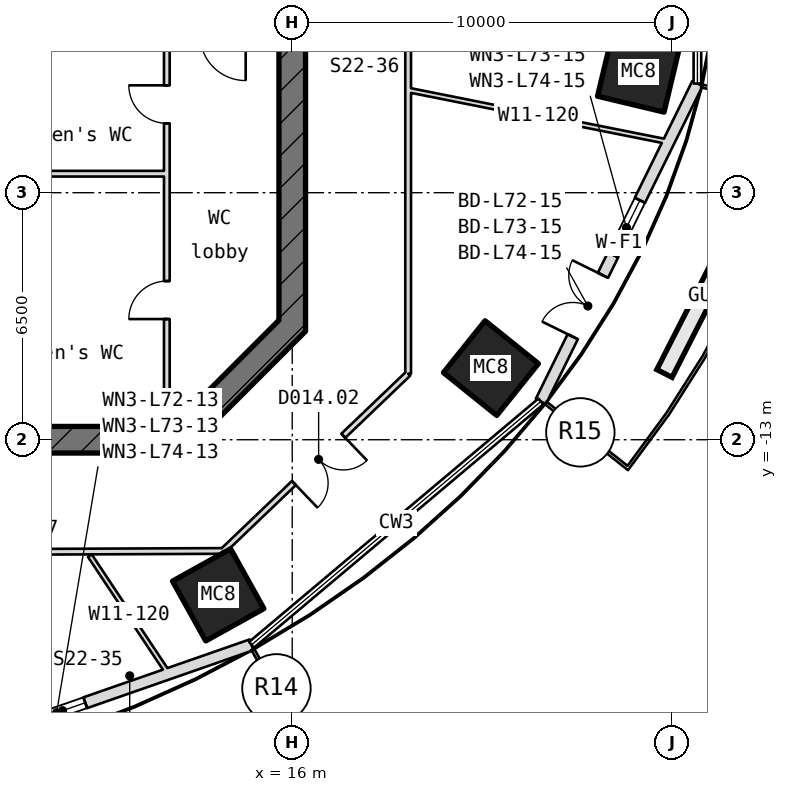
"""IFC4 building model, lengths in metres.
Left out: names, types, materials, properties, quantities, classifications, styles, units other than length and angle.
Written with IfcOpenShell. Run it as: python <this file> out.ifc"""

import sys

from ifc_helpers import new_model, si_unit, direction, frame, frame_2d, origin, origin_2d, place, context, subcontext, project, spatial, rectangle, hollow_rectangle, extrude, element, fill, save


model = new_model("IFC4")
c1 = context("Model", 3, precision=1e-05, world=origin(), true_north=direction((0.0, 1.0)))
c2 = subcontext(c1, "Body", "Model", "MODEL_VIEW")
j1 = project(units=[si_unit("LENGTHUNIT", "METRE"), si_unit("PLANEANGLEUNIT", "RADIAN")], contexts=[c1])
p1 = place(None, origin())
s1 = spatial("IfcSite", under=j1, at=p1, CompositionType="ELEMENT")
p2 = place(p1, origin())
s2 = spatial("IfcBuilding", under=s1, at=p2, CompositionType="ELEMENT")
p3 = place(p2, frame((0.0, 0.0, 321.85)))
s3 = spatial("IfcBuildingStorey", under=s2, at=p3, CompositionType="ELEMENT", Elevation=321.85)
for number, where, z_axis, x_axis in (
    (1, (14.052, -17.082, -0.18), (0.0, 0.0, 1.0), (-0.874, -0.486, 0.0)),
    (2, (21.228, -11.115, -0.18), (0.0, 0.0, 1.0), (-0.626, -0.779, 0.0)),
    (3, (25.112, -3.319, -0.18), (0.0, 0.0, 1.0), (-0.233, -0.973, 0.0)),
):
    element("IfcColumn", number, at=place(p3, frame(where, z_axis=z_axis, x_axis=x_axis)), inside=s3, PredefinedType="COLUMN", context=c2, shape_type="SweptSolid", body=[
        extrude(hollow_rectangle(XDim=1.75, YDim=1.8, WallThickness=0.055, at=origin_2d()), origin(), (0.0, 0.0, 1.0), 4.15),
    ])
p4 = place(p3, frame((4.983, -21.861, 0.0), z_axis=(0.0, 0.0, 1.0), x_axis=(0.944334385595, 0.328987185438, 0.0)))
e4 = element("IfcWall", 4, at=p4, inside=s3, PredefinedType="SOLIDWALL", context=c2, shape_type="SweptSolid", body=[
    extrude(rectangle(XDim=10.532, YDim=0.3, at=frame_2d((5.266, 0.0))), origin(), (0.0, 0.0, 1.0), 3.97),
])
p5 = place(p4, frame((1.9, 0.0, 0.0)))
e5 = element("IfcOpeningElement", 5, at=p5, cuts=e4, PredefinedType="OPENING", context=c2, shape_type="SweptSolid", body=[
    extrude(rectangle(XDim=1.8, YDim=2.4, at=frame_2d((0.9, 1.2))), frame((0.0, 0.16, 0.0), z_axis=(0.0, -1.0, 0.0), x_axis=(1.0, 0.0, 0.0)), (0.0, 0.0, 1.0), 0.32),
])
p6 = place(p4, frame((4.3, 0.0, 0.9)))
e6 = element("IfcOpeningElement", 6, at=p6, cuts=e4, PredefinedType="OPENING", context=c2, shape_type="SweptSolid", body=[
    extrude(rectangle(XDim=1.6, YDim=1.5, at=frame_2d((0.8, 0.75))), frame((0.0, 0.16, 0.0), z_axis=(0.0, -1.0, 0.0), x_axis=(1.0, 0.0, 0.0)), (0.0, 0.0, 1.0), 0.32),
])
p7 = place(p3, frame((22.542, -11.993, 0.0), z_axis=(0.0, 0.0, 1.0), x_axis=(0.441801707928, 0.897112730303, 0.0)))
e7 = element("IfcWall", 7, at=p7, inside=s3, PredefinedType="SOLIDWALL", context=c2, shape_type="SweptSolid", body=[
    extrude(rectangle(XDim=9.325, YDim=0.3, at=frame_2d((4.663, 0.0))), origin(), (0.0, 0.0, 1.0), 3.97),
])
p8 = place(p7, frame((1.9, 0.0, 0.0)))
e8 = element("IfcOpeningElement", 8, at=p8, cuts=e7, PredefinedType="OPENING", context=c2, shape_type="SweptSolid", body=[
    extrude(rectangle(XDim=1.8, YDim=2.4, at=frame_2d((0.9, 1.2))), frame((0.0, 0.16, 0.0), z_axis=(0.0, -1.0, 0.0), x_axis=(1.0, 0.0, 0.0)), (0.0, 0.0, 1.0), 0.32),
])
p9 = place(p7, frame((4.3, 0.0, 0.9)))
e9 = element("IfcOpeningElement", 9, at=p9, cuts=e7, PredefinedType="OPENING", context=c2, shape_type="SweptSolid", body=[
    extrude(rectangle(XDim=1.6, YDim=1.5, at=frame_2d((0.8, 0.75))), frame((0.0, 0.16, 0.0), z_axis=(0.0, -1.0, 0.0), x_axis=(1.0, 0.0, 0.0)), (0.0, 0.0, 1.0), 0.32),
])
p10 = place(p3, frame((12.897, -13.103, -0.18), z_axis=(0.0, 0.0, 1.0), x_axis=(0.707106781187, 0.707106781187, 0.0)))
e10 = element("IfcWall", 10, at=p10, inside=s3, PredefinedType="SHEAR", context=c2, shape_type="SweptSolid", body=[
    extrude(rectangle(XDim=4.533, YDim=0.7, at=frame_2d((2.266, 0.0))), origin(), (0.0, 0.0, 1.0), 4.15),
])
p11 = place(p3, frame((16.0, -10.145, -0.18), z_axis=(0.0, 0.0, 1.0), x_axis=(0.0, 1.0, 0.0)))
e11 = element("IfcWall", 11, at=p11, inside=s3, PredefinedType="SHEAR", context=c2, shape_type="SweptSolid", body=[
    extrude(rectangle(XDim=20.29, YDim=0.7, at=frame_2d((10.145, 0.0))), origin(), (0.0, 0.0, 1.0), 4.15),
])
p12 = place(p11, frame((8.945, 0.0, 0.18)))
e12 = element("IfcOpeningElement", 12, at=p12, cuts=e11, PredefinedType="OPENING", context=c2, shape_type="SweptSolid", body=[
    extrude(rectangle(XDim=2.4, YDim=2.1, at=frame_2d((1.2, 1.05))), frame((0.0, 0.36, 0.0), z_axis=(0.0, -1.0, 0.0), x_axis=(1.0, 0.0, 0.0)), (0.0, 0.0, 1.0), 0.72),
])
p13 = place(p11, frame((13.545, 0.0, 0.18)))
e13 = element("IfcOpeningElement", 13, at=p13, cuts=e11, PredefinedType="OPENING", context=c2, shape_type="SweptSolid", body=[
    extrude(rectangle(XDim=1.2, YDim=2.1, at=frame_2d((0.6, 1.05))), frame((0.0, 0.36, 0.0), z_axis=(0.0, -1.0, 0.0), x_axis=(1.0, 0.0, 0.0)), (0.0, 0.0, 1.0), 0.72),
])
p14 = place(p3, frame((-13.145, -13.0, -0.18), z_axis=(0.0, 0.0, 1.0), x_axis=(1.0, 0.0, 0.0)))
e14 = element("IfcWall", 14, at=p14, inside=s3, PredefinedType="SHEAR", context=c2, shape_type="SweptSolid", body=[
    extrude(rectangle(XDim=26.29, YDim=0.7, at=frame_2d((13.145, 0.0))), origin(), (0.0, 0.0, 1.0), 4.15),
])
p15 = place(p14, frame((2.845, 0.0, 0.18)))
e15 = element("IfcOpeningElement", 15, at=p15, cuts=e14, PredefinedType="OPENING", context=c2, shape_type="SweptSolid", body=[
    extrude(rectangle(XDim=1.2, YDim=2.1, at=frame_2d((0.6, 1.05))), frame((0.0, 0.36, 0.0), z_axis=(0.0, -1.0, 0.0), x_axis=(1.0, 0.0, 0.0)), (0.0, 0.0, 1.0), 0.72),
])
p16 = place(p14, frame((6.845, 0.0, 0.18)))
e16 = element("IfcOpeningElement", 16, at=p16, cuts=e14, PredefinedType="OPENING", context=c2, shape_type="SweptSolid", body=[
    extrude(rectangle(XDim=1.4, YDim=2.1, at=frame_2d((0.7, 1.05))), frame((0.0, 0.36, 0.0), z_axis=(0.0, -1.0, 0.0), x_axis=(1.0, 0.0, 0.0)), (0.0, 0.0, 1.0), 0.72),
])
p17 = place(p14, frame((15.445, 0.0, 0.18)))
e17 = element("IfcOpeningElement", 17, at=p17, cuts=e14, PredefinedType="OPENING", context=c2, shape_type="SweptSolid", body=[
    extrude(rectangle(XDim=1.4, YDim=2.1, at=frame_2d((0.7, 1.05))), frame((0.0, 0.36, 0.0), z_axis=(0.0, -1.0, 0.0), x_axis=(1.0, 0.0, 0.0)), (0.0, 0.0, 1.0), 0.72),
])
p18 = place(p3, frame((8.55, -6.0, 0.0), z_axis=(0.0, 0.0, 1.0), x_axis=(1.0, 0.0, 0.0)))
e18 = element("IfcWall", 18, at=p18, inside=s3, PredefinedType="PARTITIONING", context=c2, shape_type="SweptSolid", body=[
    extrude(rectangle(XDim=4.075, YDim=0.15, at=frame_2d((2.038, 0.0))), origin(), (0.0, 0.0, 1.0), 3.97),
])
p19 = place(p3, frame((12.7, -12.65, 0.0), z_axis=(0.0, 0.0, 1.0), x_axis=(0.0, 1.0, 0.0)))
e19 = element("IfcWall", 19, at=p19, inside=s3, PredefinedType="PARTITIONING", context=c2, shape_type="SweptSolid", body=[
    extrude(rectangle(XDim=10.225, YDim=0.15, at=frame_2d((5.112, 0.0))), origin(), (0.0, 0.0, 1.0), 3.97),
])
p20 = place(p19, frame((7.975, 0.0, 0.0)))
e20 = element("IfcOpeningElement", 20, at=p20, cuts=e19, PredefinedType="OPENING", context=c2, shape_type="SweptSolid", body=[
    extrude(rectangle(XDim=1.0, YDim=2.1, at=frame_2d((0.5, 1.05))), frame((0.0, 0.085, 0.0), z_axis=(0.0, -1.0, 0.0), x_axis=(1.0, 0.0, 0.0)), (0.0, 0.0, 1.0), 0.17),
])
p21 = place(p19, frame((2.825, 0.0, 0.0)))
e21 = element("IfcOpeningElement", 21, at=p21, cuts=e19, PredefinedType="OPENING", context=c2, shape_type="SweptSolid", body=[
    extrude(rectangle(XDim=1.0, YDim=2.1, at=frame_2d((0.5, 1.05))), frame((0.0, 0.085, 0.0), z_axis=(0.0, -1.0, 0.0), x_axis=(1.0, 0.0, 0.0)), (0.0, 0.0, 1.0), 0.17),
])
p22 = place(p3, frame((10.675, -16.05, 0.0), z_axis=(0.0, 0.0, 1.0), x_axis=(0.553809323765, -0.832643520908, 0.0)))
e22 = element("IfcWall", 22, at=p22, inside=s3, PredefinedType="PARTITIONING", context=c2, shape_type="SweptSolid", body=[
    extrude(rectangle(XDim=3.733, YDim=0.12, at=frame_2d((1.866, 0.0))), origin(), (0.0, 0.0, 1.0), 3.97),
])
p23 = place(p3, frame((14.176, -15.926, 0.0), z_axis=(0.0, 0.0, 1.0), x_axis=(-0.99999052853, -0.004352338421, 0.0)))
e23 = element("IfcWall", 23, at=p23, inside=s3, PredefinedType="PARTITIONING", context=c2, shape_type="SweptSolid", body=[
    extrude(rectangle(XDim=28.44, YDim=0.15, at=frame_2d((14.22, 0.0))), origin(), (0.0, 0.0, 1.0), 3.97),
])
p24 = place(p23, frame((21.599, 0.0, 0.0)))
e24 = element("IfcOpeningElement", 24, at=p24, cuts=e23, PredefinedType="OPENING", context=c2, shape_type="SweptSolid", body=[
    extrude(rectangle(XDim=0.95, YDim=2.1, at=frame_2d((0.475, 1.05))), frame((0.0, 0.085, 0.0), z_axis=(0.0, -1.0, 0.0), x_axis=(1.0, 0.0, 0.0)), (0.0, 0.0, 1.0), 0.17),
])
p25 = place(p23, frame((16.88, 0.0, 0.0)))
e25 = element("IfcOpeningElement", 25, at=p25, cuts=e23, PredefinedType="OPENING", context=c2, shape_type="SweptSolid", body=[
    extrude(rectangle(XDim=0.95, YDim=2.1, at=frame_2d((0.475, 1.05))), frame((0.0, 0.085, 0.0), z_axis=(0.0, -1.0, 0.0), x_axis=(1.0, 0.0, 0.0)), (0.0, 0.0, 1.0), 0.17),
])
p26 = place(p23, frame((10.427, 0.0, 0.0)))
e26 = element("IfcOpeningElement", 26, at=p26, cuts=e23, PredefinedType="OPENING", context=c2, shape_type="SweptSolid", body=[
    extrude(rectangle(XDim=0.95, YDim=2.1, at=frame_2d((0.475, 1.05))), frame((0.0, 0.085, 0.0), z_axis=(0.0, -1.0, 0.0), x_axis=(1.0, 0.0, 0.0)), (0.0, 0.0, 1.0), 0.17),
])
p27 = place(p23, frame((4.942, 0.0, 0.0)))
e27 = element("IfcOpeningElement", 27, at=p27, cuts=e23, PredefinedType="OPENING", context=c2, shape_type="SweptSolid", body=[
    extrude(rectangle(XDim=0.95, YDim=2.1, at=frame_2d((0.475, 1.05))), frame((0.0, 0.085, 0.0), z_axis=(0.0, -1.0, 0.0), x_axis=(1.0, 0.0, 0.0)), (0.0, 0.0, 1.0), 0.17),
])
p28 = place(p3, frame((19.05, -11.263, 0.0), z_axis=(0.0, 0.0, 1.0), x_axis=(-0.722587616722, -0.691279347414, 0.0)))
e28 = element("IfcWall", 28, at=p28, inside=s3, PredefinedType="PARTITIONING", context=c2, shape_type="SweptSolid", body=[
    extrude(rectangle(XDim=6.745, YDim=0.15, at=frame_2d((3.373, 0.0))), origin(), (0.0, 0.0, 1.0), 3.97),
])
p29 = place(p28, frame((2.36, 0.0, 0.0)))
e29 = element("IfcOpeningElement", 29, at=p29, cuts=e28, PredefinedType="OPENING", context=c2, shape_type="SweptSolid", body=[
    extrude(rectangle(XDim=1.8, YDim=2.1, at=frame_2d((0.9, 1.05))), frame((0.0, 0.085, 0.0), z_axis=(0.0, -1.0, 0.0), x_axis=(1.0, 0.0, 0.0)), (0.0, 0.0, 1.0), 0.17),
])
p30 = place(p3, frame((19.05, -3.797, 0.0), z_axis=(0.0, 0.0, 1.0), x_axis=(0.980706745877, -0.195484727258, 0.0)))
e30 = element("IfcWall", 30, at=p30, inside=s3, PredefinedType="PARTITIONING", context=c2, shape_type="SweptSolid", body=[
    extrude(rectangle(XDim=6.99, YDim=0.12, at=frame_2d((3.495, 0.0))), origin(), (0.0, 0.0, 1.0), 3.97),
])
p31 = place(p3, frame((19.05, 11.263, 0.0), z_axis=(0.0, 0.0, 1.0), x_axis=(0.0, -1.0, 0.0)))
e31 = element("IfcWall", 31, at=p31, inside=s3, PredefinedType="PARTITIONING", context=c2, shape_type="SweptSolid", body=[
    extrude(rectangle(XDim=22.527, YDim=0.15, at=frame_2d((11.263, 0.0))), origin(), (0.0, 0.0, 1.0), 3.97),
])
p32 = place(p31, frame((7.251, 0.0, 0.0)))
e32 = element("IfcOpeningElement", 32, at=p32, cuts=e31, PredefinedType="OPENING", context=c2, shape_type="SweptSolid", body=[
    extrude(rectangle(XDim=1.8, YDim=2.1, at=frame_2d((0.9, 1.05))), frame((0.0, 0.085, 0.0), z_axis=(0.0, -1.0, 0.0), x_axis=(1.0, 0.0, 0.0)), (0.0, 0.0, 1.0), 0.17),
])
p33 = place(p6, origin())
e33 = element("IfcWindow", 33, at=p33, inside=s3, PartitioningType="SINGLE_PANEL", PredefinedType="WINDOW", context=c2, shape_type="SweptSolid", body=[
    extrude(rectangle(XDim=1.6, YDim=1.5, at=frame_2d((0.8, 0.75))), frame((0.0, 0.03, 0.0), z_axis=(0.0, -1.0, 0.0), x_axis=(1.0, 0.0, 0.0)), (0.0, 0.0, 1.0), 0.06),
])
fill(e6, e33)
p34 = place(p8, origin())
e34 = element("IfcDoor", 34, at=p34, inside=s3, OperationType="SINGLE_SWING_LEFT", PredefinedType="DOOR", context=c2, shape_type="SweptSolid", body=[
    extrude(rectangle(XDim=1.8, YDim=2.4, at=frame_2d((0.9, 1.2))), frame((0.0, 0.025, 0.0), z_axis=(0.0, -1.0, 0.0), x_axis=(1.0, 0.0, 0.0)), (0.0, 0.0, 1.0), 0.05),
])
fill(e8, e34)
p35 = place(p9, origin())
e35 = element("IfcWindow", 35, at=p35, inside=s3, PartitioningType="SINGLE_PANEL", PredefinedType="WINDOW", context=c2, shape_type="SweptSolid", body=[
    extrude(rectangle(XDim=1.6, YDim=1.5, at=frame_2d((0.8, 0.75))), frame((0.0, 0.03, 0.0), z_axis=(0.0, -1.0, 0.0), x_axis=(1.0, 0.0, 0.0)), (0.0, 0.0, 1.0), 0.06),
])
fill(e9, e35)
p36 = place(p20, origin())
e36 = element("IfcDoor", 36, at=p36, inside=s3, OperationType="SINGLE_SWING_RIGHT", PredefinedType="DOOR", context=c2, shape_type="SweptSolid", body=[
    extrude(rectangle(XDim=1.0, YDim=2.1, at=frame_2d((0.5, 1.05))), frame((0.0, 0.025, 0.0), z_axis=(0.0, -1.0, 0.0), x_axis=(1.0, 0.0, 0.0)), (0.0, 0.0, 1.0), 0.05),
])
fill(e20, e36)
p37 = place(p21, origin())
e37 = element("IfcDoor", 37, at=p37, inside=s3, OperationType="SINGLE_SWING_RIGHT", PredefinedType="DOOR", context=c2, shape_type="SweptSolid", body=[
    extrude(rectangle(XDim=1.0, YDim=2.1, at=frame_2d((0.5, 1.05))), frame((0.0, 0.025, 0.0), z_axis=(0.0, -1.0, 0.0), x_axis=(1.0, 0.0, 0.0)), (0.0, 0.0, 1.0), 0.05),
])
fill(e21, e37)
p38 = place(p29, origin())
e38 = element("IfcDoor", 38, at=p38, inside=s3, OperationType="DOUBLE_DOOR_SINGLE_SWING", PredefinedType="DOOR", context=c2, shape_type="SweptSolid", body=[
    extrude(rectangle(XDim=1.8, YDim=2.1, at=frame_2d((0.9, 1.05))), frame((0.0, 0.025, 0.0), z_axis=(0.0, -1.0, 0.0), x_axis=(1.0, 0.0, 0.0)), (0.0, 0.0, 1.0), 0.05),
])
fill(e29, e38)
save(model, sys.argv[1])
